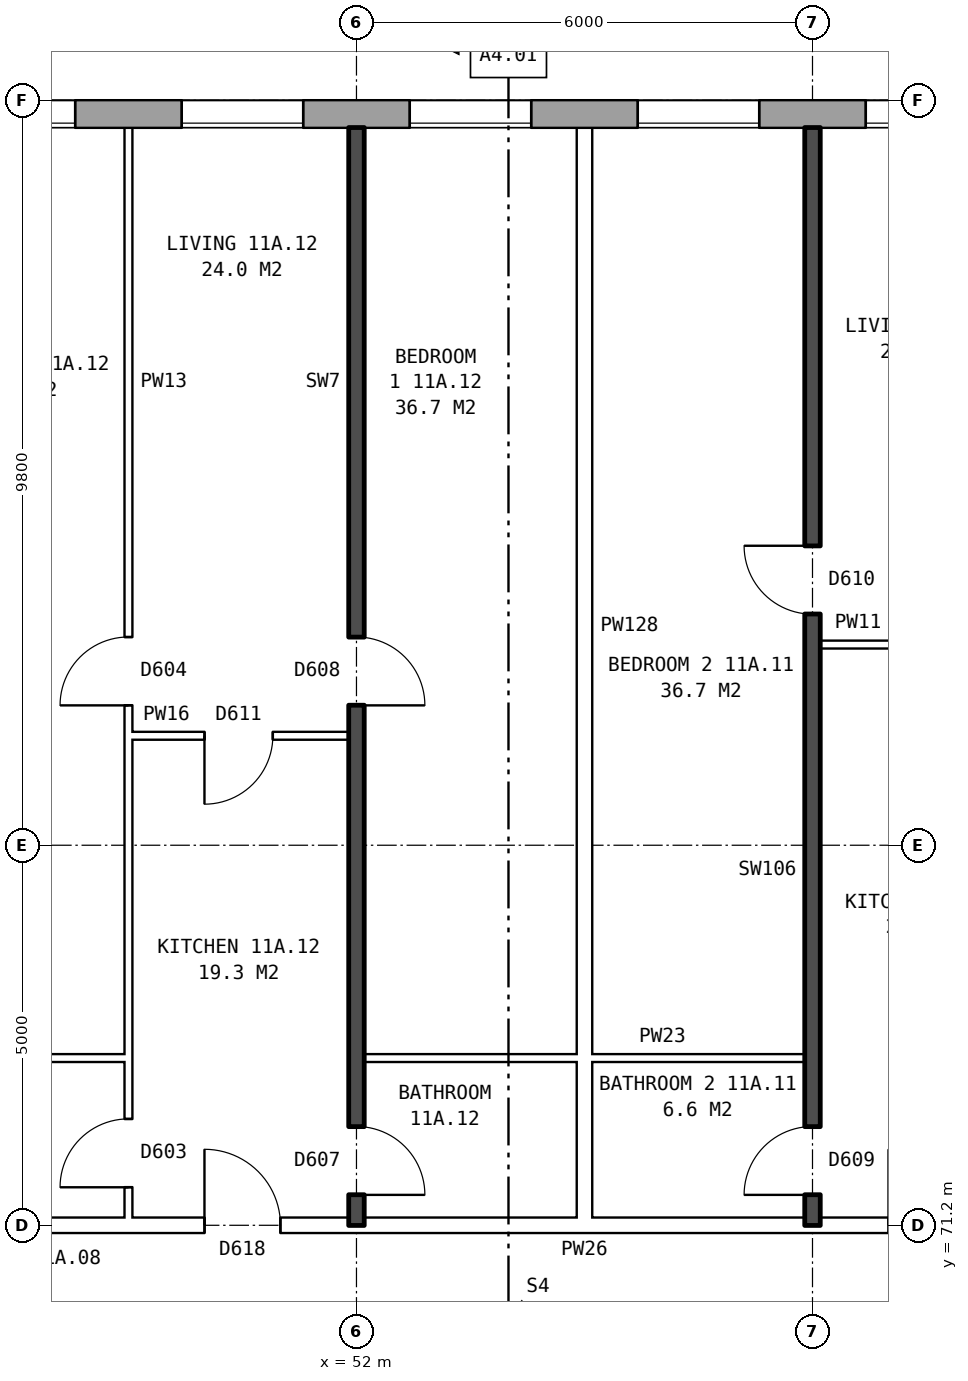
"""IFC4 building model, lengths in metres.
Left out: names, types, materials, properties, quantities, classifications, styles, units other than length and angle.
Written with IfcOpenShell. Run it as: python <this file> out.ifc"""

import sys

from ifc_helpers import new_model, si_unit, direction, frame, frame_2d, origin, place, context, subcontext, project, spatial, rectangle, extrude, element, fill, save


model = new_model("IFC4")
c1 = context("Model", 3, precision=1e-05, world=origin(), true_north=direction((0.0, 1.0)))
c2 = subcontext(c1, "Body", "Model", "MODEL_VIEW")
j1 = project(units=[si_unit("LENGTHUNIT", "METRE"), si_unit("PLANEANGLEUNIT", "RADIAN")], contexts=[c1])
p1 = place(None, origin())
s1 = spatial("IfcSite", under=j1, at=p1, CompositionType="ELEMENT")
p2 = place(p1, origin())
s2 = spatial("IfcBuilding", under=s1, at=p2, CompositionType="ELEMENT")
p3 = place(p2, frame((0.0, 0.0, 44.3)))
s3 = spatial("IfcBuildingStorey", under=s2, at=p3, CompositionType="ELEMENT", Elevation=44.3)
p4 = place(p3, frame((72.925, 85.82, 0.0), z_axis=(0.0, 0.0, 1.0), x_axis=(-1.0, 0.0, 0.0)))
e1 = element("IfcWall", 1, at=p4, inside=s3, PredefinedType="STANDARD", context=c2, shape_type="SweptSolid", body=[
    extrude(rectangle(XDim=48.351, YDim=0.36, at=frame_2d((24.175, 0.0))), origin(), (0.0, 0.0, 1.0), 2.85),
])
p5 = place(p4, frame((0.65, 0.0, 0.8)))
e2 = element("IfcOpeningElement", 2, at=p5, cuts=e1, PredefinedType="OPENING", context=c2, shape_type="SweptSolid", body=[
    extrude(rectangle(XDim=0.6, YDim=0.9, at=frame_2d((0.3, 0.45))), frame((0.0, 0.19, 0.0), z_axis=(0.0, -1.0, 0.0), x_axis=(1.0, 0.0, 0.0)), (0.0, 0.0, 1.0), 0.38),
])
p6 = place(p4, frame((3.625, 0.0, 0.8)))
e3 = element("IfcOpeningElement", 3, at=p6, cuts=e1, PredefinedType="OPENING", context=c2, shape_type="SweptSolid", body=[
    extrude(rectangle(XDim=1.6, YDim=1.8, at=frame_2d((0.8, 0.9))), frame((0.0, 0.19, 0.0), z_axis=(0.0, -1.0, 0.0), x_axis=(1.0, 0.0, 0.0)), (0.0, 0.0, 1.0), 0.38),
])
p7 = place(p4, frame((6.625, 0.0, 0.8)))
e4 = element("IfcOpeningElement", 4, at=p7, cuts=e1, PredefinedType="OPENING", context=c2, shape_type="SweptSolid", body=[
    extrude(rectangle(XDim=1.6, YDim=1.8, at=frame_2d((0.8, 0.9))), frame((0.0, 0.19, 0.0), z_axis=(0.0, -1.0, 0.0), x_axis=(1.0, 0.0, 0.0)), (0.0, 0.0, 1.0), 0.38),
])
p8 = place(p4, frame((9.625, 0.0, 0.8)))
e5 = element("IfcOpeningElement", 5, at=p8, cuts=e1, PredefinedType="OPENING", context=c2, shape_type="SweptSolid", body=[
    extrude(rectangle(XDim=1.6, YDim=1.8, at=frame_2d((0.8, 0.9))), frame((0.0, 0.19, 0.0), z_axis=(0.0, -1.0, 0.0), x_axis=(1.0, 0.0, 0.0)), (0.0, 0.0, 1.0), 0.38),
])
p9 = place(p4, frame((12.625, 0.0, 0.8)))
e6 = element("IfcOpeningElement", 6, at=p9, cuts=e1, PredefinedType="OPENING", context=c2, shape_type="SweptSolid", body=[
    extrude(rectangle(XDim=1.6, YDim=1.8, at=frame_2d((0.8, 0.9))), frame((0.0, 0.19, 0.0), z_axis=(0.0, -1.0, 0.0), x_axis=(1.0, 0.0, 0.0)), (0.0, 0.0, 1.0), 0.38),
])
p10 = place(p4, frame((15.625, 0.0, 0.8)))
e7 = element("IfcOpeningElement", 7, at=p10, cuts=e1, PredefinedType="OPENING", context=c2, shape_type="SweptSolid", body=[
    extrude(rectangle(XDim=1.6, YDim=1.8, at=frame_2d((0.8, 0.9))), frame((0.0, 0.19, 0.0), z_axis=(0.0, -1.0, 0.0), x_axis=(1.0, 0.0, 0.0)), (0.0, 0.0, 1.0), 0.38),
])
p11 = place(p4, frame((18.625, 0.0, 0.8)))
e8 = element("IfcOpeningElement", 8, at=p11, cuts=e1, PredefinedType="OPENING", context=c2, shape_type="SweptSolid", body=[
    extrude(rectangle(XDim=1.6, YDim=1.8, at=frame_2d((0.8, 0.9))), frame((0.0, 0.19, 0.0), z_axis=(0.0, -1.0, 0.0), x_axis=(1.0, 0.0, 0.0)), (0.0, 0.0, 1.0), 0.38),
])
p12 = place(p4, frame((21.625, 0.0, 0.8)))
e9 = element("IfcOpeningElement", 9, at=p12, cuts=e1, PredefinedType="OPENING", context=c2, shape_type="SweptSolid", body=[
    extrude(rectangle(XDim=1.6, YDim=1.8, at=frame_2d((0.8, 0.9))), frame((0.0, 0.19, 0.0), z_axis=(0.0, -1.0, 0.0), x_axis=(1.0, 0.0, 0.0)), (0.0, 0.0, 1.0), 0.38),
])
p13 = place(p4, frame((24.625, 0.0, 0.8)))
e10 = element("IfcOpeningElement", 10, at=p13, cuts=e1, PredefinedType="OPENING", context=c2, shape_type="SweptSolid", body=[
    extrude(rectangle(XDim=1.6, YDim=1.8, at=frame_2d((0.8, 0.9))), frame((0.0, 0.19, 0.0), z_axis=(0.0, -1.0, 0.0), x_axis=(1.0, 0.0, 0.0)), (0.0, 0.0, 1.0), 0.38),
])
p14 = place(p4, frame((27.625, 0.0, 0.8)))
e11 = element("IfcOpeningElement", 11, at=p14, cuts=e1, PredefinedType="OPENING", context=c2, shape_type="SweptSolid", body=[
    extrude(rectangle(XDim=1.6, YDim=1.8, at=frame_2d((0.8, 0.9))), frame((0.0, 0.19, 0.0), z_axis=(0.0, -1.0, 0.0), x_axis=(1.0, 0.0, 0.0)), (0.0, 0.0, 1.0), 0.38),
])
p15 = place(p4, frame((30.625, 0.0, 0.8)))
e12 = element("IfcOpeningElement", 12, at=p15, cuts=e1, PredefinedType="OPENING", context=c2, shape_type="SweptSolid", body=[
    extrude(rectangle(XDim=1.6, YDim=1.8, at=frame_2d((0.8, 0.9))), frame((0.0, 0.19, 0.0), z_axis=(0.0, -1.0, 0.0), x_axis=(1.0, 0.0, 0.0)), (0.0, 0.0, 1.0), 0.38),
])
p16 = place(p4, frame((33.625, 0.0, 0.8)))
e13 = element("IfcOpeningElement", 13, at=p16, cuts=e1, PredefinedType="OPENING", context=c2, shape_type="SweptSolid", body=[
    extrude(rectangle(XDim=1.6, YDim=1.8, at=frame_2d((0.8, 0.9))), frame((0.0, 0.19, 0.0), z_axis=(0.0, -1.0, 0.0), x_axis=(1.0, 0.0, 0.0)), (0.0, 0.0, 1.0), 0.38),
])
p17 = place(p4, frame((36.625, 0.0, 0.8)))
e14 = element("IfcOpeningElement", 14, at=p17, cuts=e1, PredefinedType="OPENING", context=c2, shape_type="SweptSolid", body=[
    extrude(rectangle(XDim=1.6, YDim=1.8, at=frame_2d((0.8, 0.9))), frame((0.0, 0.19, 0.0), z_axis=(0.0, -1.0, 0.0), x_axis=(1.0, 0.0, 0.0)), (0.0, 0.0, 1.0), 0.38),
])
p18 = place(p4, frame((39.625, 0.0, 0.8)))
e15 = element("IfcOpeningElement", 15, at=p18, cuts=e1, PredefinedType="OPENING", context=c2, shape_type="SweptSolid", body=[
    extrude(rectangle(XDim=1.6, YDim=1.8, at=frame_2d((0.8, 0.9))), frame((0.0, 0.19, 0.0), z_axis=(0.0, -1.0, 0.0), x_axis=(1.0, 0.0, 0.0)), (0.0, 0.0, 1.0), 0.38),
])
p19 = place(p4, frame((42.625, 0.0, 0.8)))
e16 = element("IfcOpeningElement", 16, at=p19, cuts=e1, PredefinedType="OPENING", context=c2, shape_type="SweptSolid", body=[
    extrude(rectangle(XDim=1.6, YDim=1.8, at=frame_2d((0.8, 0.9))), frame((0.0, 0.19, 0.0), z_axis=(0.0, -1.0, 0.0), x_axis=(1.0, 0.0, 0.0)), (0.0, 0.0, 1.0), 0.38),
])
p20 = place(p4, frame((45.125, 0.0, 0.8)))
e17 = element("IfcOpeningElement", 17, at=p20, cuts=e1, PredefinedType="OPENING", context=c2, shape_type="SweptSolid", body=[
    extrude(rectangle(XDim=1.2, YDim=1.8, at=frame_2d((0.6, 0.9))), frame((0.0, 0.19, 0.0), z_axis=(0.0, -1.0, 0.0), x_axis=(1.0, 0.0, 0.0)), (0.0, 0.0, 1.0), 0.38),
])
p21 = place(p4, frame((1.55, 0.0, 0.8)))
e18 = element("IfcOpeningElement", 18, at=p21, cuts=e1, PredefinedType="OPENING", context=c2, shape_type="SweptSolid", body=[
    extrude(rectangle(XDim=1.0, YDim=1.5, at=frame_2d((0.5, 0.75))), frame((0.0, 0.19, 0.0), z_axis=(0.0, -1.0, 0.0), x_axis=(1.0, 0.0, 0.0)), (0.0, 0.0, 1.0), 0.38),
])
p22 = place(p4, frame((46.625, 0.0, 0.8)))
e19 = element("IfcOpeningElement", 19, at=p22, cuts=e1, PredefinedType="OPENING", context=c2, shape_type="SweptSolid", body=[
    extrude(rectangle(XDim=1.0, YDim=0.9, at=frame_2d((0.5, 0.45))), frame((0.0, 0.19, 0.0), z_axis=(0.0, -1.0, 0.0), x_axis=(1.0, 0.0, 0.0)), (0.0, 0.0, 1.0), 0.38),
])
p23 = place(p3, frame((44.36, 71.2, 0.0), z_axis=(0.0, 0.0, 1.0), x_axis=(1.0, 0.0, 0.0)))
e20 = element("IfcWall", 20, at=p23, inside=s3, PredefinedType="PARTITIONING", context=c2, shape_type="SweptSolid", body=[
    extrude(rectangle(XDim=19.28, YDim=0.2, at=frame_2d((9.64, 0.0))), origin(), (0.0, 0.0, 1.0), 2.85),
])
p24 = place(p23, frame((14.64, 0.0, 0.0)))
e21 = element("IfcOpeningElement", 21, at=p24, cuts=e20, PredefinedType="OPENING", context=c2, shape_type="SweptSolid", body=[
    extrude(rectangle(XDim=1.0, YDim=2.1, at=frame_2d((0.5, 1.05))), frame((0.0, 0.11, 0.0), z_axis=(0.0, -1.0, 0.0), x_axis=(1.0, 0.0, 0.0)), (0.0, 0.0, 1.0), 0.22),
])
p25 = place(p23, frame((5.64, 0.0, 0.0)))
e22 = element("IfcOpeningElement", 22, at=p25, cuts=e20, PredefinedType="OPENING", context=c2, shape_type="SweptSolid", body=[
    extrude(rectangle(XDim=1.0, YDim=2.1, at=frame_2d((0.5, 1.05))), frame((0.0, 0.11, 0.0), z_axis=(0.0, -1.0, 0.0), x_axis=(1.0, 0.0, 0.0)), (0.0, 0.0, 1.0), 0.22),
])
p26 = place(p3, frame((46.1, 73.4, 0.0), z_axis=(0.0, 0.0, 1.0), x_axis=(1.0, 0.0, 0.0)))
e23 = element("IfcWall", 23, at=p26, inside=s3, PredefinedType="PARTITIONING", context=c2, shape_type="SweptSolid", body=[
    extrude(rectangle(XDim=2.9, YDim=0.1, at=frame_2d((1.45, 0.0))), origin(), (0.0, 0.0, 1.0), 2.85),
])
p27 = place(p3, frame((52.1, 73.4, 0.0), z_axis=(0.0, 0.0, 1.0), x_axis=(1.0, 0.0, 0.0)))
e24 = element("IfcWall", 24, at=p27, inside=s3, PredefinedType="PARTITIONING", context=c2, shape_type="SweptSolid", body=[
    extrude(rectangle(XDim=5.8, YDim=0.1, at=frame_2d((2.9, 0.0))), origin(), (0.0, 0.0, 1.0), 2.85),
])
p28 = place(p3, frame((49.0, 77.64, 0.0), z_axis=(0.0, 0.0, 1.0), x_axis=(1.0, 0.0, 0.0)))
e25 = element("IfcWall", 25, at=p28, inside=s3, PredefinedType="PARTITIONING", context=c2, shape_type="SweptSolid", body=[
    extrude(rectangle(XDim=2.9, YDim=0.1, at=frame_2d((1.45, 0.0))), origin(), (0.0, 0.0, 1.0), 2.85),
])
p29 = place(p28, frame((1.0, 0.0, 0.0)))
e26 = element("IfcOpeningElement", 26, at=p29, cuts=e25, PredefinedType="OPENING", context=c2, shape_type="SweptSolid", body=[
    extrude(rectangle(XDim=0.9, YDim=2.1, at=frame_2d((0.45, 1.05))), frame((0.0, 0.06, 0.0), z_axis=(0.0, -1.0, 0.0), x_axis=(1.0, 0.0, 0.0)), (0.0, 0.0, 1.0), 0.12),
])
p30 = place(p3, frame((58.1, 78.84, 0.0), z_axis=(0.0, 0.0, 1.0), x_axis=(1.0, 0.0, 0.0)))
e27 = element("IfcWall", 27, at=p30, inside=s3, PredefinedType="PARTITIONING", context=c2, shape_type="SweptSolid", body=[
    extrude(rectangle(XDim=2.9, YDim=0.1, at=frame_2d((1.45, 0.0))), origin(), (0.0, 0.0, 1.0), 2.85),
])
p31 = place(p30, frame((1.0, 0.0, 0.0)))
e28 = element("IfcOpeningElement", 28, at=p31, cuts=e27, PredefinedType="OPENING", context=c2, shape_type="SweptSolid", body=[
    extrude(rectangle(XDim=0.9, YDim=2.1, at=frame_2d((0.45, 1.05))), frame((0.0, 0.06, 0.0), z_axis=(0.0, -1.0, 0.0), x_axis=(1.0, 0.0, 0.0)), (0.0, 0.0, 1.0), 0.12),
])
p32 = place(p3, frame((49.0, 71.3, 0.0), z_axis=(0.0, 0.0, 1.0), x_axis=(0.0, 1.0, 0.0)))
e29 = element("IfcWall", 29, at=p32, inside=s3, PredefinedType="PARTITIONING", context=c2, shape_type="SweptSolid", body=[
    extrude(rectangle(XDim=14.34, YDim=0.1, at=frame_2d((7.17, 0.0))), origin(), (0.0, 0.0, 1.0), 2.85),
])
p33 = place(p32, frame((6.74, 0.0, 0.0)))
e30 = element("IfcOpeningElement", 30, at=p33, cuts=e29, PredefinedType="OPENING", context=c2, shape_type="SweptSolid", body=[
    extrude(rectangle(XDim=0.9, YDim=2.1, at=frame_2d((0.45, 1.05))), frame((0.0, 0.06, 0.0), z_axis=(0.0, -1.0, 0.0), x_axis=(1.0, 0.0, 0.0)), (0.0, 0.0, 1.0), 0.12),
])
p34 = place(p32, frame((0.4, 0.0, 0.0)))
e31 = element("IfcOpeningElement", 31, at=p34, cuts=e29, PredefinedType="OPENING", context=c2, shape_type="SweptSolid", body=[
    extrude(rectangle(XDim=0.9, YDim=2.1, at=frame_2d((0.45, 1.05))), frame((0.0, 0.06, 0.0), z_axis=(0.0, -1.0, 0.0), x_axis=(1.0, 0.0, 0.0)), (0.0, 0.0, 1.0), 0.12),
])
p35 = place(p3, frame((52.0, 71.2, 0.0), z_axis=(0.0, 0.0, 1.0), x_axis=(0.0, 1.0, 0.0)))
e32 = element("IfcWall", 32, at=p35, inside=s3, PredefinedType="SOLIDWALL", context=c2, shape_type="SweptSolid", body=[
    extrude(rectangle(XDim=14.44, YDim=0.2, at=frame_2d((7.22, 0.0))), origin(), (0.0, 0.0, 1.0), 2.85),
])
p36 = place(p35, frame((6.84, 0.0, 0.0)))
e33 = element("IfcOpeningElement", 33, at=p36, cuts=e32, PredefinedType="OPENING", context=c2, shape_type="SweptSolid", body=[
    extrude(rectangle(XDim=0.9, YDim=2.1, at=frame_2d((0.45, 1.05))), frame((0.0, 0.11, 0.0), z_axis=(0.0, -1.0, 0.0), x_axis=(1.0, 0.0, 0.0)), (0.0, 0.0, 1.0), 0.22),
])
p37 = place(p35, frame((0.4, 0.0, 0.0)))
e34 = element("IfcOpeningElement", 34, at=p37, cuts=e32, PredefinedType="OPENING", context=c2, shape_type="SweptSolid", body=[
    extrude(rectangle(XDim=0.9, YDim=2.1, at=frame_2d((0.45, 1.05))), frame((0.0, 0.11, 0.0), z_axis=(0.0, -1.0, 0.0), x_axis=(1.0, 0.0, 0.0)), (0.0, 0.0, 1.0), 0.22),
])
p38 = place(p3, frame((55.0, 71.3, 0.0), z_axis=(0.0, 0.0, 1.0), x_axis=(0.0, 1.0, 0.0)))
e35 = element("IfcWall", 35, at=p38, inside=s3, PredefinedType="PARTITIONING", context=c2, shape_type="SweptSolid", body=[
    extrude(rectangle(XDim=14.34, YDim=0.2, at=frame_2d((7.17, 0.0))), origin(), (0.0, 0.0, 1.0), 2.85),
])
p39 = place(p3, frame((58.0, 71.2, 0.0), z_axis=(0.0, 0.0, 1.0), x_axis=(0.0, 1.0, 0.0)))
e36 = element("IfcWall", 36, at=p39, inside=s3, PredefinedType="SOLIDWALL", context=c2, shape_type="SweptSolid", body=[
    extrude(rectangle(XDim=14.44, YDim=0.2, at=frame_2d((7.22, 0.0))), origin(), (0.0, 0.0, 1.0), 2.85),
])
p40 = place(p39, frame((8.04, 0.0, 0.0)))
e37 = element("IfcOpeningElement", 37, at=p40, cuts=e36, PredefinedType="OPENING", context=c2, shape_type="SweptSolid", body=[
    extrude(rectangle(XDim=0.9, YDim=2.1, at=frame_2d((0.45, 1.05))), frame((0.0, 0.11, 0.0), z_axis=(0.0, -1.0, 0.0), x_axis=(1.0, 0.0, 0.0)), (0.0, 0.0, 1.0), 0.22),
])
p41 = place(p39, frame((0.4, 0.0, 0.0)))
e38 = element("IfcOpeningElement", 38, at=p41, cuts=e36, PredefinedType="OPENING", context=c2, shape_type="SweptSolid", body=[
    extrude(rectangle(XDim=0.9, YDim=2.1, at=frame_2d((0.45, 1.05))), frame((0.0, 0.11, 0.0), z_axis=(0.0, -1.0, 0.0), x_axis=(1.0, 0.0, 0.0)), (0.0, 0.0, 1.0), 0.22),
])
p42 = place(p9, origin())
e39 = element("IfcWindow", 39, at=p42, inside=s3, PartitioningType="SINGLE_PANEL", PredefinedType="WINDOW", context=c2, shape_type="SweptSolid", body=[
    extrude(rectangle(XDim=1.6, YDim=1.8, at=frame_2d((0.8, 0.9))), frame((0.0, 0.15, 0.0), z_axis=(0.0, -1.0, 0.0), x_axis=(1.0, 0.0, 0.0)), (0.0, 0.0, 1.0), 0.06),
])
fill(e6, e39)
p43 = place(p10, origin())
e40 = element("IfcWindow", 40, at=p43, inside=s3, PartitioningType="SINGLE_PANEL", PredefinedType="WINDOW", context=c2, shape_type="SweptSolid", body=[
    extrude(rectangle(XDim=1.6, YDim=1.8, at=frame_2d((0.8, 0.9))), frame((0.0, 0.15, 0.0), z_axis=(0.0, -1.0, 0.0), x_axis=(1.0, 0.0, 0.0)), (0.0, 0.0, 1.0), 0.06),
])
fill(e7, e40)
p44 = place(p11, origin())
e41 = element("IfcWindow", 41, at=p44, inside=s3, PartitioningType="SINGLE_PANEL", PredefinedType="WINDOW", context=c2, shape_type="SweptSolid", body=[
    extrude(rectangle(XDim=1.6, YDim=1.8, at=frame_2d((0.8, 0.9))), frame((0.0, 0.15, 0.0), z_axis=(0.0, -1.0, 0.0), x_axis=(1.0, 0.0, 0.0)), (0.0, 0.0, 1.0), 0.06),
])
fill(e8, e41)
p45 = place(p12, origin())
e42 = element("IfcWindow", 42, at=p45, inside=s3, PartitioningType="SINGLE_PANEL", PredefinedType="WINDOW", context=c2, shape_type="SweptSolid", body=[
    extrude(rectangle(XDim=1.6, YDim=1.8, at=frame_2d((0.8, 0.9))), frame((0.0, 0.15, 0.0), z_axis=(0.0, -1.0, 0.0), x_axis=(1.0, 0.0, 0.0)), (0.0, 0.0, 1.0), 0.06),
])
fill(e9, e42)
p46 = place(p13, origin())
e43 = element("IfcWindow", 43, at=p46, inside=s3, PartitioningType="SINGLE_PANEL", PredefinedType="WINDOW", context=c2, shape_type="SweptSolid", body=[
    extrude(rectangle(XDim=1.6, YDim=1.8, at=frame_2d((0.8, 0.9))), frame((0.0, 0.15, 0.0), z_axis=(0.0, -1.0, 0.0), x_axis=(1.0, 0.0, 0.0)), (0.0, 0.0, 1.0), 0.06),
])
fill(e10, e43)
p47 = place(p40, origin())
e44 = element("IfcDoor", 44, at=p47, inside=s3, OperationType="SINGLE_SWING_RIGHT", PredefinedType="DOOR", context=c2, shape_type="SweptSolid", body=[
    extrude(rectangle(XDim=0.9, YDim=2.1, at=frame_2d((0.45, 1.05))), frame((0.0, 0.025, 0.0), z_axis=(0.0, -1.0, 0.0), x_axis=(1.0, 0.0, 0.0)), (0.0, 0.0, 1.0), 0.05),
])
fill(e37, e44)
p48 = place(p41, origin())
e45 = element("IfcDoor", 45, at=p48, inside=s3, OperationType="SINGLE_SWING_LEFT", PredefinedType="DOOR", context=c2, shape_type="SweptSolid", body=[
    extrude(rectangle(XDim=0.9, YDim=2.1, at=frame_2d((0.45, 1.05))), frame((0.0, 0.025, 0.0), z_axis=(0.0, -1.0, 0.0), x_axis=(1.0, 0.0, 0.0)), (0.0, 0.0, 1.0), 0.05),
])
fill(e38, e45)
p49 = place(p36, frame((0.9, 0.0, 0.0), z_axis=(0.0, 0.0, 1.0), x_axis=(-1.0, 0.0, 0.0)))
e46 = element("IfcDoor", 46, at=p49, inside=s3, OperationType="SINGLE_SWING_RIGHT", PredefinedType="DOOR", context=c2, shape_type="SweptSolid", body=[
    extrude(rectangle(XDim=0.9, YDim=2.1, at=frame_2d((0.45, 1.05))), frame((0.0, 0.025, 0.0), z_axis=(0.0, -1.0, 0.0), x_axis=(1.0, 0.0, 0.0)), (0.0, 0.0, 1.0), 0.05),
])
fill(e33, e46)
p50 = place(p33, origin())
e47 = element("IfcDoor", 47, at=p50, inside=s3, OperationType="SINGLE_SWING_LEFT", PredefinedType="DOOR", context=c2, shape_type="SweptSolid", body=[
    extrude(rectangle(XDim=0.9, YDim=2.1, at=frame_2d((0.45, 1.05))), frame((0.0, 0.025, 0.0), z_axis=(0.0, -1.0, 0.0), x_axis=(1.0, 0.0, 0.0)), (0.0, 0.0, 1.0), 0.05),
])
fill(e30, e47)
p51 = place(p25, origin())
e48 = element("IfcDoor", 48, at=p51, inside=s3, OperationType="SINGLE_SWING_LEFT", PredefinedType="DOOR", context=c2, shape_type="SweptSolid", body=[
    extrude(rectangle(XDim=1.0, YDim=2.1, at=frame_2d((0.5, 1.05))), frame((0.0, 0.025, 0.0), z_axis=(0.0, -1.0, 0.0), x_axis=(1.0, 0.0, 0.0)), (0.0, 0.0, 1.0), 0.05),
])
fill(e22, e48)
p52 = place(p29, frame((0.9, 0.0, 0.0), z_axis=(0.0, 0.0, 1.0), x_axis=(-1.0, 0.0, 0.0)))
e49 = element("IfcDoor", 49, at=p52, inside=s3, OperationType="SINGLE_SWING_RIGHT", PredefinedType="DOOR", context=c2, shape_type="SweptSolid", body=[
    extrude(rectangle(XDim=0.9, YDim=2.1, at=frame_2d((0.45, 1.05))), frame((0.0, 0.025, 0.0), z_axis=(0.0, -1.0, 0.0), x_axis=(1.0, 0.0, 0.0)), (0.0, 0.0, 1.0), 0.05),
])
fill(e26, e49)
p53 = place(p37, frame((0.9, 0.0, 0.0), z_axis=(0.0, 0.0, 1.0), x_axis=(-1.0, 0.0, 0.0)))
e50 = element("IfcDoor", 50, at=p53, inside=s3, OperationType="SINGLE_SWING_RIGHT", PredefinedType="DOOR", context=c2, shape_type="SweptSolid", body=[
    extrude(rectangle(XDim=0.9, YDim=2.1, at=frame_2d((0.45, 1.05))), frame((0.0, 0.025, 0.0), z_axis=(0.0, -1.0, 0.0), x_axis=(1.0, 0.0, 0.0)), (0.0, 0.0, 1.0), 0.05),
])
fill(e34, e50)
p54 = place(p34, origin())
e51 = element("IfcDoor", 51, at=p54, inside=s3, OperationType="SINGLE_SWING_LEFT", PredefinedType="DOOR", context=c2, shape_type="SweptSolid", body=[
    extrude(rectangle(XDim=0.9, YDim=2.1, at=frame_2d((0.45, 1.05))), frame((0.0, 0.025, 0.0), z_axis=(0.0, -1.0, 0.0), x_axis=(1.0, 0.0, 0.0)), (0.0, 0.0, 1.0), 0.05),
])
fill(e31, e51)
save(model, sys.argv[1])
